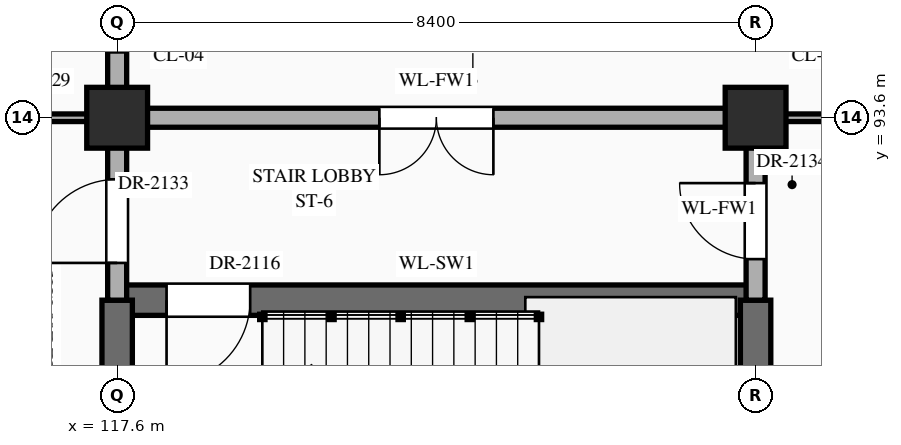
"""IFC4 building model, lengths in metres.
Left out: names, types, materials, properties, quantities, classifications, styles, units other than length and angle.
Written with IfcOpenShell. Run it as: python <this file> out.ifc"""

import sys

from ifc_helpers import new_model, si_unit, direction, frame, frame_2d, origin, origin_2d, place, context, subcontext, project, spatial, rectangle, extrude, element, fill, save


model = new_model("IFC4")
c1 = context("Model", 3, precision=1e-05, world=origin(), true_north=direction((0.0, 1.0)))
c2 = subcontext(c1, "Body", "Model", "MODEL_VIEW")
j1 = project(units=[si_unit("LENGTHUNIT", "METRE"), si_unit("PLANEANGLEUNIT", "RADIAN")], contexts=[c1])
p1 = place(None, origin())
s1 = spatial("IfcSite", under=j1, at=p1, CompositionType="ELEMENT")
p2 = place(p1, origin())
s2 = spatial("IfcBuilding", under=s1, at=p2, CompositionType="ELEMENT")
p3 = place(p2, frame((0.0, 0.0, 26.1)))
s3 = spatial("IfcBuildingStorey", under=s2, at=p3, CompositionType="ELEMENT", Elevation=26.1)
for number, where, z_axis, x_axis in (
    (1, (117.6, 93.6, 0.0), (0.0, 0.0, 1.0), (1.0, 0.0, 0.0)),
    (2, (126.0, 93.6, 0.0), (0.0, 0.0, 1.0), (1.0, 0.0, 0.0)),
):
    element("IfcColumn", number, at=place(p3, frame(where, z_axis=z_axis, x_axis=x_axis)), inside=s3, PredefinedType="COLUMN", context=c2, shape_type="SweptSolid", body=[
        extrude(rectangle(XDim=0.8, YDim=0.8, at=origin_2d()), origin(), (0.0, 0.0, 1.0), 4.5),
    ])
p4 = place(p3, frame((117.6, 91.2, 0.0), z_axis=(0.0, 0.0, 1.0), x_axis=(1.0, 0.0, 0.0)))
e3 = element("IfcWall", 3, at=p4, inside=s3, PredefinedType="SHEAR", context=c2, shape_type="SweptSolid", body=[
    extrude(rectangle(XDim=8.4, YDim=0.4, at=frame_2d((4.2, 0.0))), origin(), (0.0, 0.0, 1.0), 4.24),
])
p5 = place(p4, frame((0.65, 0.0, 0.0)))
e4 = element("IfcOpeningElement", 4, at=p5, cuts=e3, PredefinedType="OPENING", context=c2, shape_type="SweptSolid", body=[
    extrude(rectangle(XDim=1.1, YDim=2.2, at=frame_2d((0.55, 1.1))), frame((0.0, 0.212, 0.0), z_axis=(0.0, -1.0, 0.0), x_axis=(1.0, 0.0, 0.0)), (0.0, 0.0, 1.0), 0.424),
])
p6 = place(p3, frame((109.2, 93.6, 0.0), z_axis=(0.0, 0.0, 1.0), x_axis=(1.0, 0.0, 0.0)))
e5 = element("IfcWall", 5, at=p6, inside=s3, PredefinedType="STANDARD", context=c2, shape_type="SweptSolid", body=[
    extrude(rectangle(XDim=8.4, YDim=0.1, at=frame_2d((4.2, 0.0))), origin(), (0.0, 0.0, 1.0), 3.39),
])
p7 = place(p6, frame((1.02, 0.0, 0.0)))
e6 = element("IfcOpeningElement", 6, at=p7, cuts=e5, PredefinedType="OPENING", context=c2, shape_type="SweptSolid", body=[
    extrude(rectangle(XDim=1.08, YDim=2.25, at=frame_2d((0.54, 1.125))), frame((0.0, 0.062, 0.0), z_axis=(0.0, -1.0, 0.0), x_axis=(1.0, 0.0, 0.0)), (0.0, 0.0, 1.0), 0.124),
])
p8 = place(p6, frame((3.64, 0.0, 0.0)))
e7 = element("IfcOpeningElement", 7, at=p8, cuts=e5, PredefinedType="OPENING", context=c2, shape_type="SweptSolid", body=[
    extrude(rectangle(XDim=1.12, YDim=2.25, at=frame_2d((0.56, 1.125))), frame((0.0, 0.062, 0.0), z_axis=(0.0, -1.0, 0.0), x_axis=(1.0, 0.0, 0.0)), (0.0, 0.0, 1.0), 0.124),
])
p9 = place(p6, frame((6.26, 0.0, 0.0)))
e8 = element("IfcOpeningElement", 8, at=p9, cuts=e5, PredefinedType="OPENING", context=c2, shape_type="SweptSolid", body=[
    extrude(rectangle(XDim=1.16, YDim=2.3, at=frame_2d((0.58, 1.15))), frame((0.0, 0.062, 0.0), z_axis=(0.0, -1.0, 0.0), x_axis=(1.0, 0.0, 0.0)), (0.0, 0.0, 1.0), 0.124),
])
p10 = place(p3, frame((117.6, 93.6, 0.0), z_axis=(0.0, 0.0, 1.0), x_axis=(1.0, 0.0, 0.0)))
e9 = element("IfcWall", 9, at=p10, inside=s3, PredefinedType="STANDARD", context=c2, shape_type="SweptSolid", body=[
    extrude(rectangle(XDim=8.4, YDim=0.25, at=frame_2d((4.2, 0.0))), origin(), (0.0, 0.0, 1.0), 3.39),
])
p11 = place(p10, frame((3.45, 0.0, 0.0)))
e10 = element("IfcOpeningElement", 10, at=p11, cuts=e9, PredefinedType="OPENING", context=c2, shape_type="SweptSolid", body=[
    extrude(rectangle(XDim=1.5, YDim=2.25, at=frame_2d((0.75, 1.125))), frame((0.0, 0.137, 0.0), z_axis=(0.0, -1.0, 0.0), x_axis=(1.0, 0.0, 0.0)), (0.0, 0.0, 1.0), 0.274),
])
p12 = place(p3, frame((126.0, 93.6, 0.0), z_axis=(0.0, 0.0, 1.0), x_axis=(1.0, 0.0, 0.0)))
e11 = element("IfcWall", 11, at=p12, inside=s3, PredefinedType="STANDARD", context=c2, shape_type="SweptSolid", body=[
    extrude(rectangle(XDim=16.76, YDim=0.1, at=frame_2d((8.38, 0.0))), origin(), (0.0, 0.0, 1.0), 3.19),
])
p13 = place(p12, frame((3.85, 0.0, 0.0)))
e12 = element("IfcOpeningElement", 12, at=p13, cuts=e11, PredefinedType="OPENING", context=c2, shape_type="SweptSolid", body=[
    extrude(rectangle(XDim=1.02, YDim=2.4, at=frame_2d((0.51, 1.2))), frame((0.0, 0.062, 0.0), z_axis=(0.0, -1.0, 0.0), x_axis=(1.0, 0.0, 0.0)), (0.0, 0.0, 1.0), 0.124),
])
p14 = place(p12, frame((9.27, 0.0, 0.0)))
e13 = element("IfcOpeningElement", 13, at=p14, cuts=e11, PredefinedType="OPENING", context=c2, shape_type="SweptSolid", body=[
    extrude(rectangle(XDim=1.06, YDim=2.4, at=frame_2d((0.53, 1.2))), frame((0.0, 0.062, 0.0), z_axis=(0.0, -1.0, 0.0), x_axis=(1.0, 0.0, 0.0)), (0.0, 0.0, 1.0), 0.124),
])
p15 = place(p12, frame((11.65, 0.0, 0.0)))
e14 = element("IfcOpeningElement", 14, at=p15, cuts=e11, PredefinedType="OPENING", context=c2, shape_type="SweptSolid", body=[
    extrude(rectangle(XDim=1.9, YDim=2.5, at=frame_2d((0.95, 1.25))), frame((0.0, 0.062, 0.0), z_axis=(0.0, -1.0, 0.0), x_axis=(1.0, 0.0, 0.0)), (0.0, 0.0, 1.0), 0.124),
])
p16 = place(p12, frame((14.79, 0.0, 0.0)))
e15 = element("IfcOpeningElement", 15, at=p16, cuts=e11, PredefinedType="OPENING", context=c2, shape_type="SweptSolid", body=[
    extrude(rectangle(XDim=0.9, YDim=2.15, at=frame_2d((0.45, 1.075))), frame((0.0, 0.062, 0.0), z_axis=(0.0, -1.0, 0.0), x_axis=(1.0, 0.0, 0.0)), (0.0, 0.0, 1.0), 0.124),
])
p17 = place(p3, frame((117.6, 86.4, 0.0), z_axis=(0.0, 0.0, 1.0), x_axis=(0.0, 1.0, 0.0)))
e16 = element("IfcWall", 16, at=p17, inside=s3, PredefinedType="SHEAR", context=c2, shape_type="SweptSolid", body=[
    extrude(rectangle(XDim=4.8, YDim=0.4, at=frame_2d((2.4, 0.0))), origin(), (0.0, 0.0, 1.0), 4.24),
])
p18 = place(p3, frame((117.6, 91.2, 0.0), z_axis=(0.0, 0.0, 1.0), x_axis=(0.0, 1.0, 0.0)))
e17 = element("IfcWall", 17, at=p18, inside=s3, PredefinedType="STANDARD", context=c2, shape_type="SweptSolid", body=[
    extrude(rectangle(XDim=13.2, YDim=0.25, at=frame_2d((6.6, 0.0))), origin(), (0.0, 0.0, 1.0), 3.49),
])
p19 = place(p18, frame((0.49, 0.0, 0.0)))
e18 = element("IfcOpeningElement", 18, at=p19, cuts=e17, PredefinedType="OPENING", context=c2, shape_type="SweptSolid", body=[
    extrude(rectangle(XDim=1.1, YDim=2.2, at=frame_2d((0.55, 1.1))), frame((0.0, 0.137, 0.0), z_axis=(0.0, -1.0, 0.0), x_axis=(1.0, 0.0, 0.0)), (0.0, 0.0, 1.0), 0.274),
])
p20 = place(p18, frame((10.46, 0.0, 0.0)))
e19 = element("IfcOpeningElement", 19, at=p20, cuts=e17, PredefinedType="OPENING", context=c2, shape_type="SweptSolid", body=[
    extrude(rectangle(XDim=1.0, YDim=2.2, at=frame_2d((0.5, 1.1))), frame((0.0, 0.137, 0.0), z_axis=(0.0, -1.0, 0.0), x_axis=(1.0, 0.0, 0.0)), (0.0, 0.0, 1.0), 0.274),
])
p21 = place(p18, frame((3.26, 0.0, 0.0)))
e20 = element("IfcOpeningElement", 20, at=p21, cuts=e17, PredefinedType="OPENING", context=c2, shape_type="SweptSolid", body=[
    extrude(rectangle(XDim=1.0, YDim=2.2, at=frame_2d((0.5, 1.1))), frame((0.0, 0.137, 0.0), z_axis=(0.0, -1.0, 0.0), x_axis=(1.0, 0.0, 0.0)), (0.0, 0.0, 1.0), 0.274),
])
p22 = place(p3, frame((126.0, 86.4, 0.0), z_axis=(0.0, 0.0, 1.0), x_axis=(0.0, 1.0, 0.0)))
e21 = element("IfcWall", 21, at=p22, inside=s3, PredefinedType="SHEAR", context=c2, shape_type="SweptSolid", body=[
    extrude(rectangle(XDim=4.8, YDim=0.4, at=frame_2d((2.4, 0.0))), origin(), (0.0, 0.0, 1.0), 4.24),
])
p23 = place(p3, frame((126.0, 91.2, 0.0), z_axis=(0.0, 0.0, 1.0), x_axis=(0.0, 1.0, 0.0)))
e22 = element("IfcWall", 22, at=p23, inside=s3, PredefinedType="STANDARD", context=c2, shape_type="SweptSolid", body=[
    extrude(rectangle(XDim=2.4, YDim=0.25, at=frame_2d((1.2, 0.0))), origin(), (0.0, 0.0, 1.0), 3.49),
])
p24 = place(p23, frame((0.54, 0.0, 0.0)))
e23 = element("IfcOpeningElement", 23, at=p24, cuts=e22, PredefinedType="OPENING", context=c2, shape_type="SweptSolid", body=[
    extrude(rectangle(XDim=1.0, YDim=2.2, at=frame_2d((0.5, 1.1))), frame((0.0, 0.137, 0.0), z_axis=(0.0, -1.0, 0.0), x_axis=(1.0, 0.0, 0.0)), (0.0, 0.0, 1.0), 0.274),
])
p25 = place(p5, frame((1.1, 0.0, 0.0), z_axis=(0.0, 0.0, 1.0), x_axis=(-1.0, 0.0, 0.0)))
e24 = element("IfcDoor", 24, at=p25, inside=s3, OperationType="SINGLE_SWING_RIGHT", PredefinedType="DOOR", context=c2, shape_type="SweptSolid", body=[
    extrude(rectangle(XDim=1.1, YDim=2.2, at=frame_2d((0.55, 1.1))), frame((0.0, 0.025, 0.0), z_axis=(0.0, -1.0, 0.0), x_axis=(1.0, 0.0, 0.0)), (0.0, 0.0, 1.0), 0.05),
])
fill(e4, e24)
p26 = place(p11, frame((1.5, 0.0, 0.0), z_axis=(0.0, 0.0, 1.0), x_axis=(-1.0, 0.0, 0.0)))
e25 = element("IfcDoor", 25, at=p26, inside=s3, OperationType="DOUBLE_DOOR_SINGLE_SWING", PredefinedType="DOOR", context=c2, shape_type="SweptSolid", body=[
    extrude(rectangle(XDim=1.5, YDim=2.25, at=frame_2d((0.75, 1.125))), frame((0.0, 0.025, 0.0), z_axis=(0.0, -1.0, 0.0), x_axis=(1.0, 0.0, 0.0)), (0.0, 0.0, 1.0), 0.05),
])
fill(e10, e25)
p27 = place(p19, origin())
e26 = element("IfcDoor", 26, at=p27, inside=s3, OperationType="SINGLE_SWING_LEFT", PredefinedType="DOOR", context=c2, shape_type="SweptSolid", body=[
    extrude(rectangle(XDim=1.1, YDim=2.2, at=frame_2d((0.55, 1.1))), frame((0.0, 0.025, 0.0), z_axis=(0.0, -1.0, 0.0), x_axis=(1.0, 0.0, 0.0)), (0.0, 0.0, 1.0), 0.05),
])
fill(e18, e26)
p28 = place(p24, origin())
e27 = element("IfcDoor", 27, at=p28, inside=s3, OperationType="SINGLE_SWING_RIGHT", PredefinedType="DOOR", context=c2, shape_type="SweptSolid", body=[
    extrude(rectangle(XDim=1.0, YDim=2.2, at=frame_2d((0.5, 1.1))), frame((0.0, 0.025, 0.0), z_axis=(0.0, -1.0, 0.0), x_axis=(1.0, 0.0, 0.0)), (0.0, 0.0, 1.0), 0.05),
])
fill(e23, e27)
save(model, sys.argv[1])
